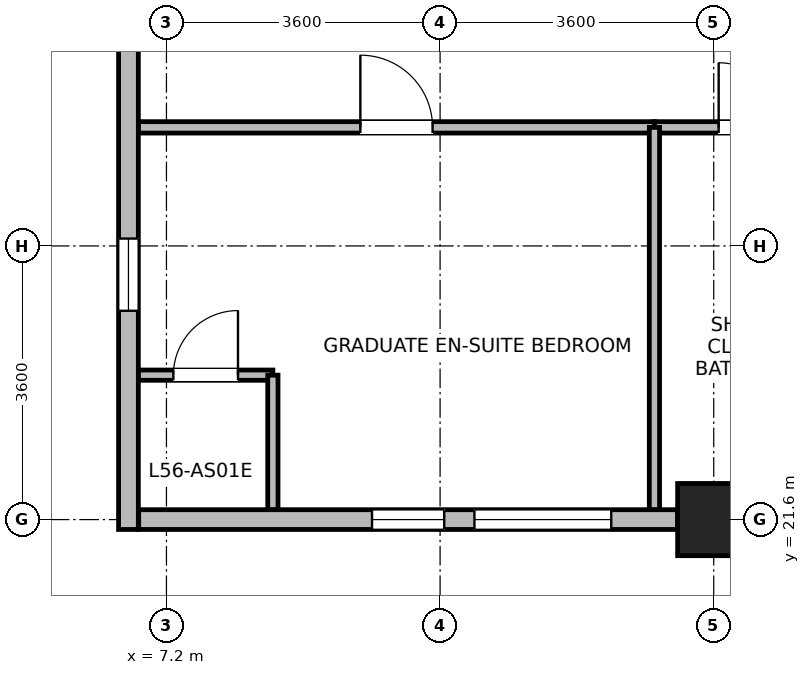
"""IFC4 building model, lengths in metres.
Left out: names, types, materials, properties, quantities, classifications, styles, units other than length and angle.
Written with IfcOpenShell. Run it as: python <this file> out.ifc"""

import sys

from ifc_helpers import new_model, si_unit, direction, frame, frame_2d, origin, origin_2d, place, context, subcontext, project, spatial, rectangle, extrude, source, transform, mapped, element, fill, save


model = new_model("IFC4")
c1 = context("Model", 3, precision=1e-05, world=origin(), true_north=direction((0.0, 1.0)))
c2 = subcontext(c1, "Body", "Model", "MODEL_VIEW")
j1 = project(units=[si_unit("LENGTHUNIT", "METRE"), si_unit("PLANEANGLEUNIT", "RADIAN")], contexts=[c1])
p1 = place(None, origin())
s1 = spatial("IfcSite", under=j1, at=p1, CompositionType="ELEMENT")
p2 = place(p1, origin())
s2 = spatial("IfcBuilding", under=s1, at=p2, CompositionType="ELEMENT")
p3 = place(p2, frame((0.0, 0.0, 220.3)))
s3 = spatial("IfcBuildingStorey", under=s2, at=p3, CompositionType="ELEMENT", Elevation=220.3)
m1 = source(origin(), c2, "Body", "SweptSolid", [
    extrude(rectangle(XDim=0.95, YDim=0.95, at=origin_2d()), origin(), (0.0, 0.0, 1.0), 3.7),
])
p4 = place(p3, frame((14.4, 21.6, 0.0), z_axis=(0.0, 0.0, 1.0), x_axis=(1.0, 0.0, 0.0)))
e1 = element("IfcColumn", 1, at=p4, inside=s3, PredefinedType="COLUMN", context=c2, shape_type="MappedRepresentation", body=[
    mapped(m1, transform((0.0, 0.0, 0.0), x_axis=(1.0, 0.0, 0.0), y_axis=(0.0, 1.0, 0.0), z_axis=(0.0, 0.0, 1.0), scale=1.0)),
])
p5 = place(p3, frame((6.7, 21.47, 0.0), z_axis=(0.0, 0.0, 1.0), x_axis=(0.0, 1.0, 0.0)))
e2 = element("IfcWall", 2, at=p5, inside=s3, PredefinedType="STANDARD", context=c2, shape_type="SweptSolid", body=[
    extrude(rectangle(XDim=6.704, YDim=0.26, at=frame_2d((3.352, 0.0))), origin(), (0.0, 0.0, 1.0), 3.45),
])
p6 = place(p5, frame((2.877, 0.0, 0.85)))
e3 = element("IfcOpeningElement", 3, at=p6, cuts=e2, PredefinedType="OPENING", context=c2, shape_type="SweptSolid", body=[
    extrude(rectangle(XDim=0.95, YDim=1.75, at=frame_2d((0.475, 0.875))), frame((0.0, 0.14, 0.0), z_axis=(0.0, -1.0, 0.0), x_axis=(1.0, 0.0, 0.0)), (0.0, 0.0, 1.0), 0.28),
])
p7 = place(p3, frame((13.924, 21.6, 0.0), z_axis=(0.0, 0.0, 1.0), x_axis=(-1.0, 0.0, 0.0)))
e4 = element("IfcWall", 4, at=p7, inside=s3, PredefinedType="STANDARD", context=c2, shape_type="SweptSolid", body=[
    extrude(rectangle(XDim=7.089, YDim=0.26, at=frame_2d((3.544, 0.0))), origin(), (0.0, 0.0, 1.0), 3.45),
])
p8 = place(p7, frame((0.872, 0.0, 0.85)))
e5 = element("IfcOpeningElement", 5, at=p8, cuts=e4, PredefinedType="OPENING", context=c2, shape_type="SweptSolid", body=[
    extrude(rectangle(XDim=1.8, YDim=1.85, at=frame_2d((0.9, 0.925))), frame((0.0, 0.14, 0.0), z_axis=(0.0, -1.0, 0.0), x_axis=(1.0, 0.0, 0.0)), (0.0, 0.0, 1.0), 0.28),
])
p9 = place(p7, frame((3.07, 0.0, 0.85)))
e6 = element("IfcOpeningElement", 6, at=p9, cuts=e4, PredefinedType="OPENING", context=c2, shape_type="SweptSolid", body=[
    extrude(rectangle(XDim=0.95, YDim=1.75, at=frame_2d((0.475, 0.875))), frame((0.0, 0.14, 0.0), z_axis=(0.0, -1.0, 0.0), x_axis=(1.0, 0.0, 0.0)), (0.0, 0.0, 1.0), 0.28),
])
p10 = place(p3, frame((6.832, 23.5, 0.0), z_axis=(0.0, 0.0, 1.0), x_axis=(1.0, 0.0, 0.0)))
e7 = element("IfcWall", 7, at=p10, inside=s3, PredefinedType="PARTITIONING", context=c2, shape_type="SweptSolid", body=[
    extrude(rectangle(XDim=1.768, YDim=0.135, at=frame_2d((0.884, 0.0))), origin(), (0.0, 0.0, 1.0), 3.45),
])
p11 = place(p10, frame((0.459, 0.0, 0.0)))
e8 = element("IfcOpeningElement", 8, at=p11, cuts=e7, PredefinedType="OPENING", context=c2, shape_type="SweptSolid", body=[
    extrude(rectangle(XDim=0.85, YDim=2.04, at=frame_2d((0.425, 1.02))), frame((0.0, 0.078, 0.0), z_axis=(0.0, -1.0, 0.0), x_axis=(1.0, 0.0, 0.0)), (0.0, 0.0, 1.0), 0.155),
])
p12 = place(p3, frame((8.6, 21.732, 0.0), z_axis=(0.0, 0.0, 1.0), x_axis=(0.0, 1.0, 0.0)))
e9 = element("IfcWall", 9, at=p12, inside=s3, PredefinedType="PARTITIONING", context=c2, shape_type="SweptSolid", body=[
    extrude(rectangle(XDim=1.768, YDim=0.135, at=frame_2d((0.884, 0.0))), origin(), (0.0, 0.0, 1.0), 3.45),
])
p13 = place(p3, frame((6.832, 26.76, 0.0), z_axis=(0.0, 0.0, 1.0), x_axis=(1.0, 0.0, 0.0)))
e10 = element("IfcWall", 10, at=p13, inside=s3, PredefinedType="PARTITIONING", context=c2, shape_type="SweptSolid", body=[
    extrude(rectangle(XDim=6.788, YDim=0.15, at=frame_2d((3.394, 0.0))), origin(), (0.0, 0.0, 1.0), 3.45),
])
p14 = place(p13, frame((2.919, 0.0, 0.0)))
e11 = element("IfcOpeningElement", 11, at=p14, cuts=e10, PredefinedType="OPENING", context=c2, shape_type="SweptSolid", body=[
    extrude(rectangle(XDim=0.95, YDim=2.1, at=frame_2d((0.475, 1.05))), frame((0.0, 0.085, 0.0), z_axis=(0.0, -1.0, 0.0), x_axis=(1.0, 0.0, 0.0)), (0.0, 0.0, 1.0), 0.17),
])
p15 = place(p3, frame((13.62, 26.76, 0.0), z_axis=(0.0, 0.0, 1.0), x_axis=(1.0, 0.0, 0.0)))
e12 = element("IfcWall", 12, at=p15, inside=s3, PredefinedType="PARTITIONING", context=c2, shape_type="SweptSolid", body=[
    extrude(rectangle(XDim=2.54, YDim=0.15, at=frame_2d((1.27, 0.0))), origin(), (0.0, 0.0, 1.0), 3.45),
])
p16 = place(p15, frame((0.845, 0.0, 0.0)))
e13 = element("IfcOpeningElement", 13, at=p16, cuts=e12, PredefinedType="OPENING", context=c2, shape_type="SweptSolid", body=[
    extrude(rectangle(XDim=0.85, YDim=2.04, at=frame_2d((0.425, 1.02))), frame((0.0, 0.085, 0.0), z_axis=(0.0, -1.0, 0.0), x_axis=(1.0, 0.0, 0.0)), (0.0, 0.0, 1.0), 0.17),
])
p17 = place(p3, frame((13.62, 21.732, 0.0), z_axis=(0.0, 0.0, 1.0), x_axis=(0.0, 1.0, 0.0)))
e14 = element("IfcWall", 14, at=p17, inside=s3, PredefinedType="PARTITIONING", context=c2, shape_type="SweptSolid", body=[
    extrude(rectangle(XDim=5.028, YDim=0.135, at=frame_2d((2.514, 0.0))), origin(), (0.0, 0.0, 1.0), 3.45),
])
p18 = place(p6, origin())
e15 = element("IfcWindow", 15, at=p18, inside=s3, PartitioningType="SINGLE_PANEL", PredefinedType="WINDOW", context=c2, shape_type="SweptSolid", body=[
    extrude(rectangle(XDim=0.95, YDim=1.75, at=frame_2d((0.475, 0.875))), frame((0.0, 0.03, 0.0), z_axis=(0.0, -1.0, 0.0), x_axis=(1.0, 0.0, 0.0)), (0.0, 0.0, 1.0), 0.06),
])
fill(e3, e15)
p19 = place(p8, origin())
e16 = element("IfcWindow", 16, at=p19, inside=s3, PartitioningType="SINGLE_PANEL", PredefinedType="WINDOW", context=c2, shape_type="SweptSolid", body=[
    extrude(rectangle(XDim=1.8, YDim=1.85, at=frame_2d((0.9, 0.925))), frame((0.0, 0.03, 0.0), z_axis=(0.0, -1.0, 0.0), x_axis=(1.0, 0.0, 0.0)), (0.0, 0.0, 1.0), 0.06),
])
fill(e5, e16)
p20 = place(p9, origin())
e17 = element("IfcWindow", 17, at=p20, inside=s3, PartitioningType="SINGLE_PANEL", PredefinedType="WINDOW", context=c2, shape_type="SweptSolid", body=[
    extrude(rectangle(XDim=0.95, YDim=1.75, at=frame_2d((0.475, 0.875))), frame((0.0, 0.03, 0.0), z_axis=(0.0, -1.0, 0.0), x_axis=(1.0, 0.0, 0.0)), (0.0, 0.0, 1.0), 0.06),
])
fill(e6, e17)
p21 = place(p11, origin())
e18 = element("IfcDoor", 18, at=p21, inside=s3, OperationType="SINGLE_SWING_RIGHT", PredefinedType="DOOR", context=c2, shape_type="SweptSolid", body=[
    extrude(rectangle(XDim=0.85, YDim=2.04, at=frame_2d((0.425, 1.02))), frame((0.0, 0.025, 0.0), z_axis=(0.0, -1.0, 0.0), x_axis=(1.0, 0.0, 0.0)), (0.0, 0.0, 1.0), 0.05),
])
fill(e8, e18)
p22 = place(p14, origin())
e19 = element("IfcDoor", 19, at=p22, inside=s3, OperationType="SINGLE_SWING_LEFT", PredefinedType="DOOR", context=c2, shape_type="SweptSolid", body=[
    extrude(rectangle(XDim=0.95, YDim=2.1, at=frame_2d((0.475, 1.05))), frame((0.0, 0.025, 0.0), z_axis=(0.0, -1.0, 0.0), x_axis=(1.0, 0.0, 0.0)), (0.0, 0.0, 1.0), 0.05),
])
fill(e11, e19)
p23 = place(p16, origin())
e20 = element("IfcDoor", 20, at=p23, inside=s3, OperationType="SINGLE_SWING_LEFT", PredefinedType="DOOR", context=c2, shape_type="SweptSolid", body=[
    extrude(rectangle(XDim=0.85, YDim=2.04, at=frame_2d((0.425, 1.02))), frame((0.0, 0.025, 0.0), z_axis=(0.0, -1.0, 0.0), x_axis=(1.0, 0.0, 0.0)), (0.0, 0.0, 1.0), 0.05),
])
fill(e13, e20)
save(model, sys.argv[1])
